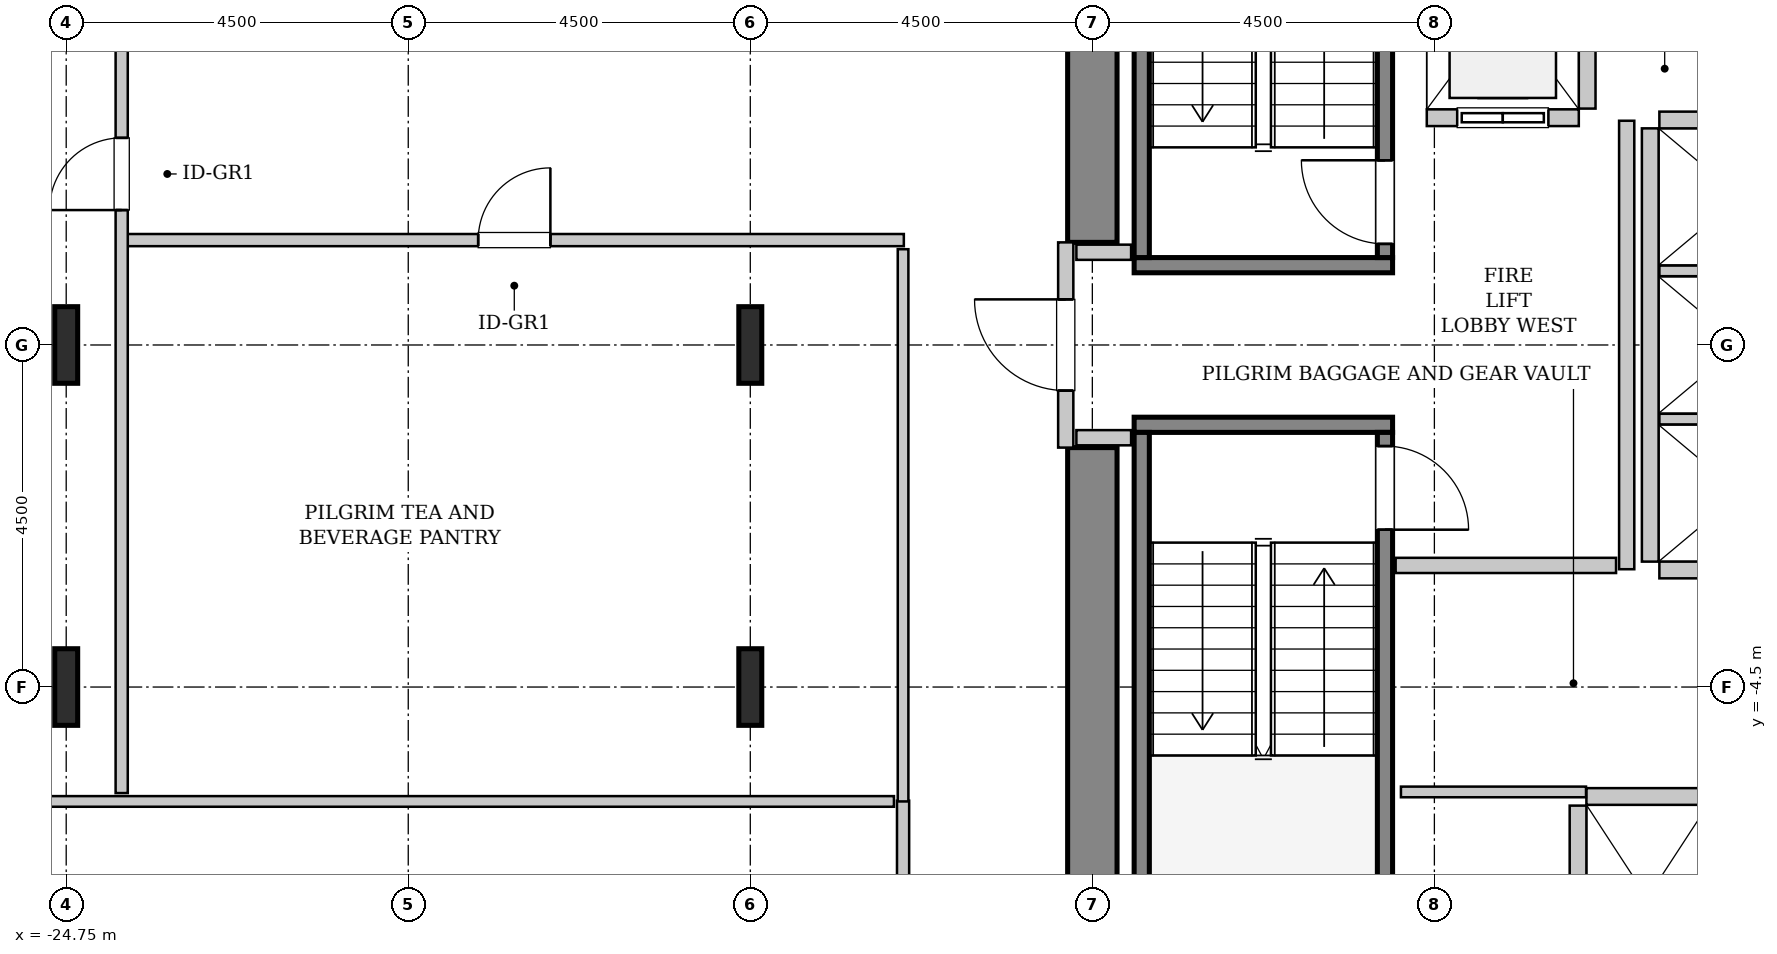
"""IFC4 building model, lengths in metres.
Left out: names, types, materials, properties, quantities, classifications, styles, units other than length and angle.
Written with IfcOpenShell. Run it as: python <this file> out.ifc"""

import sys

from ifc_helpers import new_model, si_unit, direction, frame, frame_2d, origin, origin_2d, place, context, subcontext, project, spatial, rectangle, i_section, extrude, source, transform, mapped, element, fill, save


model = new_model("IFC4")
c1 = context("Model", 3, precision=1e-05, world=origin(), true_north=direction((0.0, 1.0)))
c2 = subcontext(c1, "Body", "Model", "MODEL_VIEW")
j1 = project(units=[si_unit("LENGTHUNIT", "METRE"), si_unit("PLANEANGLEUNIT", "RADIAN")], contexts=[c1])
p1 = place(None, origin())
s1 = spatial("IfcSite", under=j1, at=p1, CompositionType="ELEMENT")
p2 = place(p1, origin())
s2 = spatial("IfcBuilding", under=s1, at=p2, CompositionType="ELEMENT")
p3 = place(p2, frame((0.0, 0.0, 63.4)))
s3 = spatial("IfcBuildingStorey", under=s2, at=p3, CompositionType="ELEMENT", Elevation=63.4)
m1 = source(origin(), c2, "Body", "SweptSolid", [
    extrude(rectangle(XDim=7.325, YDim=0.65, at=frame_2d((3.663, 0.0))), origin(), (0.0, 0.0, 1.0), 3.8),
])
for number, where, z_axis, x_axis in (
    (1, (-11.25, -8.675, 0.0), (0.0, 0.0, 1.0), (0.0, 1.0, 0.0)),
    (2, (-11.25, 1.35, 0.0), (0.0, 0.0, 1.0), (0.0, 1.0, 0.0)),
):
    element("IfcWall", number, at=place(p3, frame(where, z_axis=z_axis, x_axis=x_axis)), inside=s3, PredefinedType="SHEAR", context=c2, shape_type="MappedRepresentation", body=[
        mapped(m1, transform((0.0, 0.0, 0.0), x_axis=(1.0, 0.0, 0.0), y_axis=(0.0, 1.0, 0.0), z_axis=(0.0, 0.0, 1.0), scale=1.0)),
    ])
m2 = source(origin(), c2, "Body", "SweptSolid", [
    extrude(i_section(OverallWidth=0.302, OverallDepth=1.008, WebThickness=0.021, FlangeThickness=0.04, FilletRadius=0.03, at=origin_2d()), origin(), (0.0, 0.0, 1.0), 3.8),
])
for number, where, z_axis, x_axis in (
    (3, (-24.75, -4.5, 0.0), (0.0, 0.0, 1.0), (1.0, 0.0, 0.0)),
    (4, (-24.75, 0.0, 0.0), (0.0, 0.0, 1.0), (1.0, 0.0, 0.0)),
    (5, (-15.75, -4.5, 0.0), (0.0, 0.0, 1.0), (1.0, 0.0, 0.0)),
    (6, (-15.75, 0.0, 0.0), (0.0, 0.0, 1.0), (1.0, 0.0, 0.0)),
):
    element("IfcColumn", number, at=place(p3, frame(where, z_axis=z_axis, x_axis=x_axis)), inside=s3, PredefinedType="COLUMN", context=c2, shape_type="MappedRepresentation", body=[
        mapped(m2, transform((0.0, 0.0, 0.0), x_axis=(1.0, 0.0, 0.0), y_axis=(0.0, 1.0, 0.0), z_axis=(0.0, 0.0, 1.0), scale=1.0)),
    ])
m3 = source(origin(), c2, "Body", "SweptSolid", [
    extrude(rectangle(XDim=3.4, YDim=0.2, at=frame_2d((1.7, 0.0))), origin(), (0.0, 0.0, 1.0), 3.8),
])
p4 = place(p3, frame((-7.3, 1.05, 0.0), z_axis=(0.0, 0.0, 1.0), x_axis=(-1.0, 0.0, 0.0)))
e7 = element("IfcWall", 7, at=p4, inside=s3, PredefinedType="SOLIDWALL", context=c2, shape_type="MappedRepresentation", body=[
    mapped(m3, transform((0.0, 0.0, 0.0), x_axis=(1.0, 0.0, 0.0), y_axis=(0.0, 1.0, 0.0), z_axis=(0.0, 0.0, 1.0), scale=1.0)),
])
m4 = source(origin(), c2, "Body", "SweptSolid", [
    extrude(rectangle(XDim=7.1, YDim=0.2, at=frame_2d((3.55, 0.0))), origin(), (0.0, 0.0, 1.0), 3.8),
])
p5 = place(p3, frame((-7.4, 1.15, 0.0), z_axis=(0.0, 0.0, 1.0), x_axis=(0.0, 1.0, 0.0)))
e8 = element("IfcWall", 8, at=p5, inside=s3, PredefinedType="SOLIDWALL", context=c2, shape_type="MappedRepresentation", body=[
    mapped(m4, transform((0.0, 0.0, 0.0), x_axis=(1.0, 0.0, 0.0), y_axis=(0.0, 1.0, 0.0), z_axis=(0.0, 0.0, 1.0), scale=1.0)),
])
p6 = place(p5, frame((0.18, 0.0, 0.0)))
e9 = element("IfcOpeningElement", 9, at=p6, cuts=e8, PredefinedType="OPENING", context=c2, shape_type="SweptSolid", body=[
    extrude(rectangle(XDim=1.1, YDim=2.15, at=frame_2d((0.55, 1.075))), frame((0.0, 0.11, 0.0), z_axis=(0.0, -1.0, 0.0), x_axis=(1.0, 0.0, 0.0)), (0.0, 0.0, 1.0), 0.22),
])
p7 = place(p3, frame((-10.6, 1.15, 0.0), z_axis=(0.0, 0.0, 1.0), x_axis=(0.0, 1.0, 0.0)))
e10 = element("IfcWall", 10, at=p7, inside=s3, PredefinedType="SOLIDWALL", context=c2, shape_type="MappedRepresentation", body=[
    mapped(m4, transform((0.0, 0.0, 0.0), x_axis=(1.0, 0.0, 0.0), y_axis=(0.0, 1.0, 0.0), z_axis=(0.0, 0.0, 1.0), scale=1.0)),
])
p8 = place(p3, frame((-10.7, -1.05, 0.0), z_axis=(0.0, 0.0, 1.0), x_axis=(1.0, 0.0, 0.0)))
e11 = element("IfcWall", 11, at=p8, inside=s3, PredefinedType="SOLIDWALL", context=c2, shape_type="MappedRepresentation", body=[
    mapped(m3, transform((0.0, 0.0, 0.0), x_axis=(1.0, 0.0, 0.0), y_axis=(0.0, 1.0, 0.0), z_axis=(0.0, 0.0, 1.0), scale=1.0)),
])
p9 = place(p3, frame((-10.6, -1.15, 0.0), z_axis=(0.0, 0.0, 1.0), x_axis=(0.0, -1.0, 0.0)))
e12 = element("IfcWall", 12, at=p9, inside=s3, PredefinedType="SOLIDWALL", context=c2, shape_type="MappedRepresentation", body=[
    mapped(m4, transform((0.0, 0.0, 0.0), x_axis=(1.0, 0.0, 0.0), y_axis=(0.0, 1.0, 0.0), z_axis=(0.0, 0.0, 1.0), scale=1.0)),
])
p10 = place(p3, frame((-7.4, -1.15, 0.0), z_axis=(0.0, 0.0, 1.0), x_axis=(0.0, -1.0, 0.0)))
e13 = element("IfcWall", 13, at=p10, inside=s3, PredefinedType="SOLIDWALL", context=c2, shape_type="MappedRepresentation", body=[
    mapped(m4, transform((0.0, 0.0, 0.0), x_axis=(1.0, 0.0, 0.0), y_axis=(0.0, 1.0, 0.0), z_axis=(0.0, 0.0, 1.0), scale=1.0)),
])
p11 = place(p10, frame((0.18, 0.0, 0.0)))
e14 = element("IfcOpeningElement", 14, at=p11, cuts=e13, PredefinedType="OPENING", context=c2, shape_type="SweptSolid", body=[
    extrude(rectangle(XDim=1.1, YDim=2.15, at=frame_2d((0.55, 1.075))), frame((0.0, 0.11, 0.0), z_axis=(0.0, -1.0, 0.0), x_axis=(1.0, 0.0, 0.0)), (0.0, 0.0, 1.0), 0.22),
])
m5 = source(origin(), c2, "Body", "SweptSolid", [
    extrude(rectangle(XDim=2.0, YDim=0.22, at=frame_2d((1.0, 0.0))), origin(), (0.0, 0.0, 1.0), 3.535),
])
p12 = place(p3, frame((-6.85, 2.99, 0.0), z_axis=(0.0, 0.0, 1.0), x_axis=(1.0, 0.0, 0.0)))
e15 = element("IfcWall", 15, at=p12, inside=s3, PredefinedType="SOLIDWALL", context=c2, shape_type="MappedRepresentation", body=[
    mapped(m5, transform((0.0, 0.0, 0.0), x_axis=(1.0, 0.0, 0.0), y_axis=(0.0, 1.0, 0.0), z_axis=(0.0, 0.0, 1.0), scale=1.0)),
])
p13 = place(p12, frame((0.4, 0.0, 0.0)))
e16 = element("IfcOpeningElement", 16, at=p13, cuts=e15, PredefinedType="OPENING", context=c2, shape_type="SweptSolid", body=[
    extrude(rectangle(XDim=1.2, YDim=2.2, at=frame_2d((0.6, 1.1))), frame((0.0, 0.12, 0.0), z_axis=(0.0, -1.0, 0.0), x_axis=(1.0, 0.0, 0.0)), (0.0, 0.0, 1.0), 0.24),
])
m6 = source(origin(), c2, "Body", "SweptSolid", [
    extrude(rectangle(XDim=2.68, YDim=0.22, at=frame_2d((1.34, 0.0))), origin(), (0.0, 0.0, 1.0), 3.535),
])
p14 = place(p3, frame((-4.74, 3.11, 0.0), z_axis=(0.0, 0.0, 1.0), x_axis=(0.0, 1.0, 0.0)))
e17 = element("IfcWall", 17, at=p14, inside=s3, PredefinedType="SOLIDWALL", context=c2, shape_type="MappedRepresentation", body=[
    mapped(m6, transform((0.0, 0.0, 0.0), x_axis=(1.0, 0.0, 0.0), y_axis=(0.0, 1.0, 0.0), z_axis=(0.0, 0.0, 1.0), scale=1.0)),
])
m7 = source(origin(), c2, "Body", "SweptSolid", [
    extrude(rectangle(XDim=3.2, YDim=0.22, at=frame_2d((1.6, 0.0))), origin(), (0.0, 0.0, 1.0), 3.535),
])
p15 = place(p3, frame((-1.55, -5.94, 0.0), z_axis=(0.0, 0.0, 1.0), x_axis=(-1.0, 0.0, 0.0)))
e18 = element("IfcWall", 18, at=p15, inside=s3, PredefinedType="SOLIDWALL", context=c2, shape_type="MappedRepresentation", body=[
    mapped(m7, transform((0.0, 0.0, 0.0), x_axis=(1.0, 0.0, 0.0), y_axis=(0.0, 1.0, 0.0), z_axis=(0.0, 0.0, 1.0), scale=1.0)),
])
m8 = source(origin(), c2, "Body", "SweptSolid", [
    extrude(rectangle(XDim=2.43, YDim=0.22, at=frame_2d((1.215, 0.0))), origin(), (0.0, 0.0, 1.0), 3.535),
])
p16 = place(p3, frame((-4.86, -6.06, 0.0), z_axis=(0.0, 0.0, 1.0), x_axis=(0.0, -1.0, 0.0)))
e19 = element("IfcWall", 19, at=p16, inside=s3, PredefinedType="SOLIDWALL", context=c2, shape_type="MappedRepresentation", body=[
    mapped(m8, transform((0.0, 0.0, 0.0), x_axis=(1.0, 0.0, 0.0), y_axis=(0.0, 1.0, 0.0), z_axis=(0.0, 0.0, 1.0), scale=1.0)),
])
m9 = source(origin(), c2, "Body", "SweptSolid", [
    extrude(rectangle(XDim=5.7, YDim=0.22, at=frame_2d((2.85, 0.0))), origin(), (0.0, 0.0, 1.0), 3.535),
])
p17 = place(p3, frame((-3.91, 2.85, 0.0), z_axis=(0.0, 0.0, 1.0), x_axis=(0.0, -1.0, 0.0)))
e20 = element("IfcWall", 20, at=p17, inside=s3, PredefinedType="SOLIDWALL", context=c2, shape_type="MappedRepresentation", body=[
    mapped(m9, transform((0.0, 0.0, 0.0), x_axis=(1.0, 0.0, 0.0), y_axis=(0.0, 1.0, 0.0), z_axis=(0.0, 0.0, 1.0), scale=1.0)),
])
m10 = source(origin(), c2, "Body", "SweptSolid", [
    extrude(rectangle(XDim=2.13, YDim=0.22, at=frame_2d((1.065, 0.0))), origin(), (0.0, 0.0, 1.0), 3.535),
])
p18 = place(p3, frame((-3.79, -2.96, 0.0), z_axis=(0.0, 0.0, 1.0), x_axis=(1.0, 0.0, 0.0)))
e21 = element("IfcWall", 21, at=p18, inside=s3, PredefinedType="SOLIDWALL", context=c2, shape_type="MappedRepresentation", body=[
    mapped(m10, transform((0.0, 0.0, 0.0), x_axis=(1.0, 0.0, 0.0), y_axis=(0.0, 1.0, 0.0), z_axis=(0.0, 0.0, 1.0), scale=1.0)),
])
m11 = source(origin(), c2, "Body", "SweptSolid", [
    extrude(rectangle(XDim=2.13, YDim=0.14, at=frame_2d((1.065, 0.0))), origin(), (0.0, 0.0, 1.0), 3.535),
])
for number, where, z_axis, x_axis in (
    (22, (-3.79, -0.975, 0.0), (0.0, 0.0, 1.0), (1.0, 0.0, 0.0)),
    (23, (-3.79, 0.975, 0.0), (0.0, 0.0, 1.0), (1.0, 0.0, 0.0)),
):
    element("IfcWall", number, at=place(p3, frame(where, z_axis=z_axis, x_axis=x_axis)), inside=s3, PredefinedType="PARTITIONING", context=c2, shape_type="MappedRepresentation", body=[
        mapped(m11, transform((0.0, 0.0, 0.0), x_axis=(1.0, 0.0, 0.0), y_axis=(0.0, 1.0, 0.0), z_axis=(0.0, 0.0, 1.0), scale=1.0)),
    ])
p19 = place(p3, frame((-1.66, 2.96, 0.0), z_axis=(0.0, 0.0, 1.0), x_axis=(-1.0, 0.0, 0.0)))
e24 = element("IfcWall", 24, at=p19, inside=s3, PredefinedType="SOLIDWALL", context=c2, shape_type="MappedRepresentation", body=[
    mapped(m10, transform((0.0, 0.0, 0.0), x_axis=(1.0, 0.0, 0.0), y_axis=(0.0, 1.0, 0.0), z_axis=(0.0, 0.0, 1.0), scale=1.0)),
])
m12 = source(origin(), c2, "Body", "SweptSolid", [
    extrude(rectangle(XDim=2.7, YDim=0.2, at=frame_2d((1.35, 0.0))), origin(), (0.0, 0.0, 1.0), 2.425),
])
p20 = place(p3, frame((-11.6, -1.35, 0.0), z_axis=(0.0, 0.0, 1.0), x_axis=(0.0, 1.0, 0.0)))
e25 = element("IfcWall", 25, at=p20, inside=s3, PredefinedType="PARTITIONING", context=c2, shape_type="MappedRepresentation", body=[
    mapped(m12, transform((0.0, 0.0, 0.0), x_axis=(1.0, 0.0, 0.0), y_axis=(0.0, 1.0, 0.0), z_axis=(0.0, 0.0, 1.0), scale=1.0)),
])
p21 = place(p20, frame((0.75, 0.0, 0.0)))
e26 = element("IfcOpeningElement", 26, at=p21, cuts=e25, PredefinedType="OPENING", context=c2, shape_type="SweptSolid", body=[
    extrude(rectangle(XDim=1.2, YDim=2.15, at=frame_2d((0.6, 1.075))), frame((0.0, 0.11, 0.0), z_axis=(0.0, -1.0, 0.0), x_axis=(1.0, 0.0, 0.0)), (0.0, 0.0, 1.0), 0.22),
])
m13 = source(origin(), c2, "Body", "SweptSolid", [
    extrude(rectangle(XDim=5.9, YDim=0.2, at=frame_2d((2.95, 0.0))), origin(), (0.0, 0.0, 1.0), 3.535),
])
p22 = place(p3, frame((-4.22, -2.95, 0.0), z_axis=(0.0, 0.0, 1.0), x_axis=(0.0, 1.0, 0.0)))
e27 = element("IfcWall", 27, at=p22, inside=s3, PredefinedType="PARTITIONING", context=c2, shape_type="MappedRepresentation", body=[
    mapped(m13, transform((0.0, 0.0, 0.0), x_axis=(1.0, 0.0, 0.0), y_axis=(0.0, 1.0, 0.0), z_axis=(0.0, 0.0, 1.0), scale=1.0)),
])
m14 = source(origin(), c2, "Body", "SweptSolid", [
    extrude(rectangle(XDim=2.9, YDim=0.2, at=frame_2d((1.45, 0.0))), origin(), (0.0, 0.0, 1.0), 3.535),
])
p23 = place(p3, frame((-7.26, -2.9, 0.0), z_axis=(0.0, 0.0, 1.0), x_axis=(1.0, 0.0, 0.0)))
e28 = element("IfcWall", 28, at=p23, inside=s3, PredefinedType="PARTITIONING", context=c2, shape_type="MappedRepresentation", body=[
    mapped(m14, transform((0.0, 0.0, 0.0), x_axis=(1.0, 0.0, 0.0), y_axis=(0.0, 1.0, 0.0), z_axis=(0.0, 0.0, 1.0), scale=1.0)),
])
m15 = source(origin(), c2, "Body", "SweptSolid", [
    extrude(rectangle(XDim=0.72, YDim=0.2, at=frame_2d((0.36, 0.0))), origin(), (0.0, 0.0, 1.0), 3.535),
])
for number, where, z_axis, x_axis in (
    (29, (-11.46, 1.22, 0.0), (0.0, 0.0, 1.0), (1.0, 0.0, 0.0)),
    (30, (-11.46, -1.22, 0.0), (0.0, 0.0, 1.0), (1.0, 0.0, 0.0)),
):
    element("IfcWall", number, at=place(p3, frame(where, z_axis=z_axis, x_axis=x_axis)), inside=s3, PredefinedType="PARTITIONING", context=c2, shape_type="MappedRepresentation", body=[
        mapped(m15, transform((0.0, 0.0, 0.0), x_axis=(1.0, 0.0, 0.0), y_axis=(0.0, 1.0, 0.0), z_axis=(0.0, 0.0, 1.0), scale=1.0)),
    ])
m16 = source(origin(), c2, "Body", "SweptSolid", [
    extrude(rectangle(XDim=2.435, YDim=0.14, at=frame_2d((1.218, 0.0))), origin(), (0.0, 0.0, 1.0), 3.535),
])
p24 = place(p3, frame((-7.19, -5.88, 0.0), z_axis=(0.0, 0.0, 1.0), x_axis=(1.0, 0.0, 0.0)))
e31 = element("IfcWall", 31, at=p24, inside=s3, PredefinedType="PARTITIONING", context=c2, shape_type="MappedRepresentation", body=[
    mapped(m16, transform((0.0, 0.0, 0.0), x_axis=(1.0, 0.0, 0.0), y_axis=(0.0, 1.0, 0.0), z_axis=(0.0, 0.0, 1.0), scale=1.0)),
])
m17 = source(origin(), c2, "Body", "SweptSolid", [
    extrude(rectangle(XDim=15.245, YDim=0.16, at=frame_2d((7.623, 0.0))), origin(), (0.0, 0.0, 1.0), 3.535),
])
p25 = place(p3, frame((-13.74, -21.24, 0.0), z_axis=(0.0, 0.0, 1.0), x_axis=(0.0, 1.0, 0.0)))
e32 = element("IfcWall", 32, at=p25, inside=s3, PredefinedType="PARTITIONING", context=c2, shape_type="MappedRepresentation", body=[
    mapped(m17, transform((0.0, 0.0, 0.0), x_axis=(1.0, 0.0, 0.0), y_axis=(0.0, 1.0, 0.0), z_axis=(0.0, 0.0, 1.0), scale=1.0)),
])
p26 = place(p25, frame((12.012, 0.0, 0.0)))
e33 = element("IfcOpeningElement", 33, at=p26, cuts=e32, PredefinedType="OPENING", context=c2, shape_type="SweptSolid", body=[
    extrude(rectangle(XDim=0.95, YDim=2.1, at=frame_2d((0.475, 1.05))), frame((0.0, 0.09, 0.0), z_axis=(0.0, -1.0, 0.0), x_axis=(1.0, 0.0, 0.0)), (0.0, 0.0, 1.0), 0.18),
])
m18 = source(origin(), c2, "Body", "SweptSolid", [
    extrude(rectangle(XDim=20.43, YDim=0.14, at=frame_2d((10.215, 0.0))), origin(), (0.0, 0.0, 1.0), 3.535),
])
p27 = place(p3, frame((-34.29, -6.005, 0.0), z_axis=(0.0, 0.0, 1.0), x_axis=(1.0, 0.0, 0.0)))
e34 = element("IfcWall", 34, at=p27, inside=s3, PredefinedType="PARTITIONING", context=c2, shape_type="MappedRepresentation", body=[
    mapped(m18, transform((0.0, 0.0, 0.0), x_axis=(1.0, 0.0, 0.0), y_axis=(0.0, 1.0, 0.0), z_axis=(0.0, 0.0, 1.0), scale=1.0)),
])
m19 = source(origin(), c2, "Body", "SweptSolid", [
    extrude(rectangle(XDim=10.25, YDim=0.16, at=frame_2d((5.125, 0.0))), origin(), (0.0, 0.0, 1.0), 3.535),
])
p28 = place(p3, frame((-23.98, 1.38, 0.0), z_axis=(0.0, 0.0, 1.0), x_axis=(1.0, 0.0, 0.0)))
e35 = element("IfcWall", 35, at=p28, inside=s3, PredefinedType="PARTITIONING", context=c2, shape_type="MappedRepresentation", body=[
    mapped(m19, transform((0.0, 0.0, 0.0), x_axis=(1.0, 0.0, 0.0), y_axis=(0.0, 1.0, 0.0), z_axis=(0.0, 0.0, 1.0), scale=1.0)),
])
p29 = place(p28, frame((4.65, 0.0, 0.0)))
e36 = element("IfcOpeningElement", 36, at=p29, cuts=e35, PredefinedType="OPENING", context=c2, shape_type="SweptSolid", body=[
    extrude(rectangle(XDim=0.95, YDim=2.1, at=frame_2d((0.475, 1.05))), frame((0.0, 0.09, 0.0), z_axis=(0.0, -1.0, 0.0), x_axis=(1.0, 0.0, 0.0)), (0.0, 0.0, 1.0), 0.18),
])
m20 = source(origin(), c2, "Body", "SweptSolid", [
    extrude(rectangle(XDim=7.265, YDim=0.14, at=frame_2d((3.632, 0.0))), origin(), (0.0, 0.0, 1.0), 3.535),
])
p30 = place(p3, frame((-13.74, -6.005, 0.0), z_axis=(0.0, 0.0, 1.0), x_axis=(0.0, 1.0, 0.0)))
e37 = element("IfcWall", 37, at=p30, inside=s3, PredefinedType="PARTITIONING", context=c2, shape_type="MappedRepresentation", body=[
    mapped(m20, transform((0.0, 0.0, 0.0), x_axis=(1.0, 0.0, 0.0), y_axis=(0.0, 1.0, 0.0), z_axis=(0.0, 0.0, 1.0), scale=1.0)),
])
m21 = source(origin(), c2, "Body", "SweptSolid", [
    extrude(rectangle(XDim=14.282, YDim=0.16, at=frame_2d((7.141, 0.0))), origin(), (0.0, 0.0, 1.0), 3.535),
])
p31 = place(p3, frame((-24.02, -5.895, 0.0), z_axis=(0.0, 0.0, 1.0), x_axis=(0.0, 1.0, 0.0)))
e38 = element("IfcWall", 38, at=p31, inside=s3, PredefinedType="PARTITIONING", context=c2, shape_type="MappedRepresentation", body=[
    mapped(m21, transform((0.0, 0.0, 0.0), x_axis=(1.0, 0.0, 0.0), y_axis=(0.0, 1.0, 0.0), z_axis=(0.0, 0.0, 1.0), scale=1.0)),
])
p32 = place(p31, frame((7.67, 0.0, 0.0)))
e39 = element("IfcOpeningElement", 39, at=p32, cuts=e38, PredefinedType="OPENING", context=c2, shape_type="SweptSolid", body=[
    extrude(rectangle(XDim=0.95, YDim=2.1, at=frame_2d((0.475, 1.05))), frame((0.0, 0.09, 0.0), z_axis=(0.0, -1.0, 0.0), x_axis=(1.0, 0.0, 0.0)), (0.0, 0.0, 1.0), 0.18),
])
m22 = source(origin(), c2, "Body", "SweptSolid", [
    extrude(rectangle(XDim=1.1, YDim=2.15, at=frame_2d((0.55, 1.075))), frame((0.0, 0.025, 0.0), z_axis=(0.0, -1.0, 0.0), x_axis=(1.0, 0.0, 0.0)), (0.0, 0.0, 1.0), 0.05),
])
p33 = place(p6, origin())
e40 = element("IfcDoor", 40, at=p33, inside=s3, OperationType="SINGLE_SWING_RIGHT", PredefinedType="DOOR", context=c2, shape_type="MappedRepresentation", body=[
    mapped(m22, transform((0.0, 0.0, 0.0), x_axis=(1.0, 0.0, 0.0), y_axis=(0.0, 1.0, 0.0), z_axis=(0.0, 0.0, 1.0), scale=1.0)),
])
fill(e9, e40)
p34 = place(p11, origin())
e41 = element("IfcDoor", 41, at=p34, inside=s3, OperationType="SINGLE_SWING_RIGHT", PredefinedType="DOOR", context=c2, shape_type="MappedRepresentation", body=[
    mapped(m22, transform((0.0, 0.0, 0.0), x_axis=(1.0, 0.0, 0.0), y_axis=(0.0, 1.0, 0.0), z_axis=(0.0, 0.0, 1.0), scale=1.0)),
])
fill(e14, e41)
m23 = source(origin(), c2, "Body", "SweptSolid", [
    extrude(rectangle(XDim=1.2, YDim=2.2, at=frame_2d((0.6, 1.1))), frame((0.0, 0.025, 0.0), z_axis=(0.0, -1.0, 0.0), x_axis=(1.0, 0.0, 0.0)), (0.0, 0.0, 1.0), 0.05),
])
p35 = place(p13, origin())
e42 = element("IfcDoor", 42, at=p35, inside=s3, OperationType="SLIDING_TO_LEFT", PredefinedType="DOOR", context=c2, shape_type="MappedRepresentation", body=[
    mapped(m23, transform((0.0, 0.0, 0.0), x_axis=(1.0, 0.0, 0.0), y_axis=(0.0, 1.0, 0.0), z_axis=(0.0, 0.0, 1.0), scale=1.0)),
])
fill(e16, e42)
m24 = source(origin(), c2, "Body", "SweptSolid", [
    extrude(rectangle(XDim=1.2, YDim=2.15, at=frame_2d((0.6, 1.075))), frame((0.0, 0.025, 0.0), z_axis=(0.0, -1.0, 0.0), x_axis=(1.0, 0.0, 0.0)), (0.0, 0.0, 1.0), 0.05),
])
p36 = place(p21, origin())
e43 = element("IfcDoor", 43, at=p36, inside=s3, OperationType="SINGLE_SWING_RIGHT", PredefinedType="DOOR", context=c2, shape_type="MappedRepresentation", body=[
    mapped(m24, transform((0.0, 0.0, 0.0), x_axis=(1.0, 0.0, 0.0), y_axis=(0.0, 1.0, 0.0), z_axis=(0.0, 0.0, 1.0), scale=1.0)),
])
fill(e26, e43)
m25 = source(origin(), c2, "Body", "SweptSolid", [
    extrude(rectangle(XDim=0.95, YDim=2.1, at=frame_2d((0.475, 1.05))), frame((0.0, 0.025, 0.0), z_axis=(0.0, -1.0, 0.0), x_axis=(1.0, 0.0, 0.0)), (0.0, 0.0, 1.0), 0.05),
])
p37 = place(p29, origin())
e44 = element("IfcDoor", 44, at=p37, inside=s3, OperationType="SINGLE_SWING_RIGHT", PredefinedType="DOOR", context=c2, shape_type="MappedRepresentation", body=[
    mapped(m25, transform((0.0, 0.0, 0.0), x_axis=(1.0, 0.0, 0.0), y_axis=(0.0, 1.0, 0.0), z_axis=(0.0, 0.0, 1.0), scale=1.0)),
])
fill(e36, e44)
p38 = place(p32, origin())
e45 = element("IfcDoor", 45, at=p38, inside=s3, OperationType="SINGLE_SWING_LEFT", PredefinedType="DOOR", context=c2, shape_type="MappedRepresentation", body=[
    mapped(m25, transform((0.0, 0.0, 0.0), x_axis=(1.0, 0.0, 0.0), y_axis=(0.0, 1.0, 0.0), z_axis=(0.0, 0.0, 1.0), scale=1.0)),
])
fill(e39, e45)
save(model, sys.argv[1])
